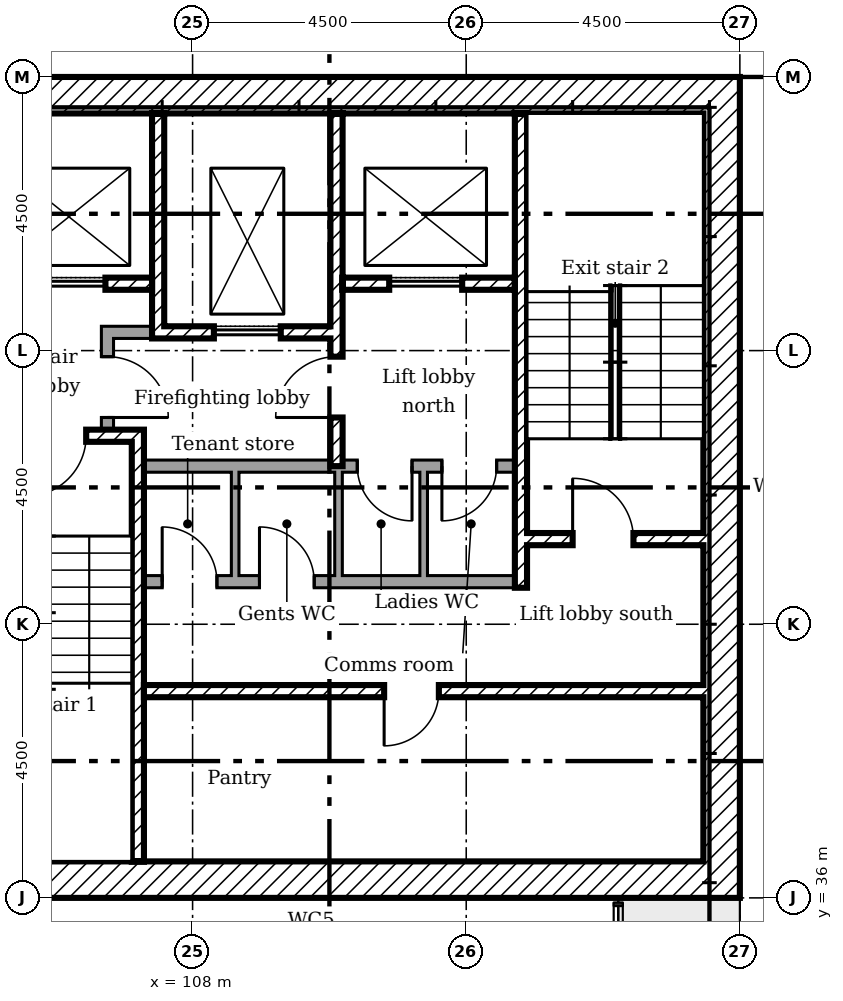
"""IFC4 building model, lengths in metres.
Left out: names, types, materials, properties, quantities, classifications, styles, units other than length and angle.
Written with IfcOpenShell. Run it as: python <this file> out.ifc"""

import sys

from ifc_helpers import new_model, si_unit, direction, frame, frame_2d, origin, place, context, subcontext, project, spatial, rectangle, extrude, element, fill, save


model = new_model("IFC4")
c1 = context("Model", 3, precision=1e-05, world=origin(), true_north=direction((0.0, 1.0)))
c2 = subcontext(c1, "Body", "Model", "MODEL_VIEW")
j1 = project(units=[si_unit("LENGTHUNIT", "METRE"), si_unit("PLANEANGLEUNIT", "RADIAN")], contexts=[c1])
p1 = place(None, origin())
s1 = spatial("IfcSite", under=j1, at=p1, CompositionType="ELEMENT")
p2 = place(p1, origin())
s2 = spatial("IfcBuilding", under=s1, at=p2, CompositionType="ELEMENT")
p3 = place(p2, frame((0.0, 0.0, 176.2)))
s3 = spatial("IfcBuildingStorey", under=s2, at=p3, CompositionType="ELEMENT", Elevation=176.2)
p4 = place(p3, frame((116.7, 36.0, 0.0), z_axis=(0.0, 0.0, 1.0), x_axis=(0.0, 1.0, 0.0)))
e1 = element("IfcWall", 1, at=p4, inside=s3, PredefinedType="SHEAR", context=c2, shape_type="SweptSolid", body=[
    extrude(rectangle(XDim=13.5, YDim=0.6, at=frame_2d((6.75, 0.0))), origin(), (0.0, 0.0, 1.0), 3.35),
])
for number, where in (
    (2, (103.5, 49.2, 0.0)),
    (3, (103.5, 36.3, 0.0)),
):
    element("IfcWall", number, at=place(p3, frame(where)), inside=s3, PredefinedType="SHEAR", context=c2, shape_type="SweptSolid", body=[
        extrude(rectangle(XDim=12.9, YDim=0.6, at=frame_2d((6.45, 0.0))), origin(), (0.0, 0.0, 1.0), 3.35),
    ])
p5 = place(p3, frame((107.433, 48.9, 0.0), z_axis=(0.0, 0.0, 1.0), x_axis=(0.0, -1.0, 0.0)))
e4 = element("IfcWall", 4, at=p5, inside=s3, PredefinedType="SHEAR", context=c2, shape_type="SweptSolid", body=[
    extrude(rectangle(XDim=3.7, YDim=0.2, at=frame_2d((1.85, 0.0))), origin(), (0.0, 0.0, 1.0), 3.35),
])
p6 = place(p3, frame((110.367, 48.9, 0.0), z_axis=(0.0, 0.0, 1.0), x_axis=(0.0, -1.0, 0.0)))
e5 = element("IfcWall", 5, at=p6, inside=s3, PredefinedType="SHEAR", context=c2, shape_type="SweptSolid", body=[
    extrude(rectangle(XDim=5.8, YDim=0.2, at=frame_2d((2.9, 0.0))), origin(), (0.0, 0.0, 1.0), 3.35),
])
p7 = place(p6, frame((4.0, 0.0, 0.0)))
e6 = element("IfcOpeningElement", 6, at=p7, cuts=e5, PredefinedType="OPENING", context=c2, shape_type="SweptSolid", body=[
    extrude(rectangle(XDim=1.0, YDim=2.1, at=frame_2d((0.5, 1.05))), frame((0.0, 0.11, 0.0), z_axis=(0.0, -1.0, 0.0), x_axis=(1.0, 0.0, 0.0)), (0.0, 0.0, 1.0), 0.22),
])
p8 = place(p3, frame((106.5, 45.3, 0.0)))
e7 = element("IfcWall", 7, at=p8, inside=s3, PredefinedType="PARTITIONING", context=c2, shape_type="SweptSolid", body=[
    extrude(rectangle(XDim=0.833, YDim=0.2, at=frame_2d((0.417, 0.0))), origin(), (0.0, 0.0, 1.0), 3.35),
])
p9 = place(p3, frame((106.6, 43.7, 0.0), z_axis=(0.0, 0.0, 1.0), x_axis=(0.0, 1.0, 0.0)))
e8 = element("IfcWall", 8, at=p9, inside=s3, PredefinedType="PARTITIONING", context=c2, shape_type="SweptSolid", body=[
    extrude(rectangle(XDim=1.5, YDim=0.2, at=frame_2d((0.75, 0.0))), origin(), (0.0, 0.0, 1.0), 3.35),
])
p10 = place(p9, frame((0.2, 0.0, 0.0)))
e9 = element("IfcOpeningElement", 9, at=p10, cuts=e8, PredefinedType="OPENING", context=c2, shape_type="SweptSolid", body=[
    extrude(rectangle(XDim=1.0, YDim=2.1, at=frame_2d((0.5, 1.05))), frame((0.0, 0.11, 0.0), z_axis=(0.0, -1.0, 0.0), x_axis=(1.0, 0.0, 0.0)), (0.0, 0.0, 1.0), 0.22),
])
p11 = place(p3, frame((104.1, 46.1, 0.0)))
e10 = element("IfcWall", 10, at=p11, inside=s3, PredefinedType="SHEAR", context=c2, shape_type="SweptSolid", body=[
    extrude(rectangle(XDim=3.233, YDim=0.2, at=frame_2d((1.617, 0.0))), origin(), (0.0, 0.0, 1.0), 3.35),
])
p12 = place(p11, frame((1.267, 0.0, 0.0)))
e11 = element("IfcOpeningElement", 11, at=p12, cuts=e10, PredefinedType="OPENING", context=c2, shape_type="SweptSolid", body=[
    extrude(rectangle(XDim=1.2, YDim=2.1, at=frame_2d((0.6, 1.05))), frame((0.0, 0.11, 0.0), z_axis=(0.0, -1.0, 0.0), x_axis=(1.0, 0.0, 0.0)), (0.0, 0.0, 1.0), 0.22),
])
p13 = place(p3, frame((110.467, 46.1, 0.0)))
e12 = element("IfcWall", 12, at=p13, inside=s3, PredefinedType="SHEAR", context=c2, shape_type="SweptSolid", body=[
    extrude(rectangle(XDim=2.833, YDim=0.2, at=frame_2d((1.417, 0.0))), origin(), (0.0, 0.0, 1.0), 3.35),
])
p14 = place(p13, frame((0.767, 0.0, 0.0)))
e13 = element("IfcOpeningElement", 13, at=p14, cuts=e12, PredefinedType="OPENING", context=c2, shape_type="SweptSolid", body=[
    extrude(rectangle(XDim=1.2, YDim=2.1, at=frame_2d((0.6, 1.05))), frame((0.0, 0.11, 0.0), z_axis=(0.0, -1.0, 0.0), x_axis=(1.0, 0.0, 0.0)), (0.0, 0.0, 1.0), 0.22),
])
p15 = place(p3, frame((107.533, 45.3, 0.0)))
e14 = element("IfcWall", 14, at=p15, inside=s3, PredefinedType="SHEAR", context=c2, shape_type="SweptSolid", body=[
    extrude(rectangle(XDim=2.733, YDim=0.2, at=frame_2d((1.367, 0.0))), origin(), (0.0, 0.0, 1.0), 3.35),
])
p16 = place(p15, frame((0.817, 0.0, 0.0)))
e15 = element("IfcOpeningElement", 15, at=p16, cuts=e14, PredefinedType="OPENING", context=c2, shape_type="SweptSolid", body=[
    extrude(rectangle(XDim=1.1, YDim=2.1, at=frame_2d((0.55, 1.05))), frame((0.0, 0.11, 0.0), z_axis=(0.0, -1.0, 0.0), x_axis=(1.0, 0.0, 0.0)), (0.0, 0.0, 1.0), 0.22),
])
p17 = place(p3, frame((107.2, 39.4, 0.0)))
e16 = element("IfcWall", 16, at=p17, inside=s3, PredefinedType="SHEAR", context=c2, shape_type="SweptSolid", body=[
    extrude(rectangle(XDim=9.2, YDim=0.2, at=frame_2d((4.6, 0.0))), origin(), (0.0, 0.0, 1.0), 3.35),
])
p18 = place(p17, frame((3.95, 0.0, 0.0)))
e17 = element("IfcOpeningElement", 17, at=p18, cuts=e16, PredefinedType="OPENING", context=c2, shape_type="SweptSolid", body=[
    extrude(rectangle(XDim=0.9, YDim=2.1, at=frame_2d((0.45, 1.05))), frame((0.0, 0.11, 0.0), z_axis=(0.0, -1.0, 0.0), x_axis=(1.0, 0.0, 0.0)), (0.0, 0.0, 1.0), 0.22),
])
p19 = place(p3, frame((107.1, 36.6, 0.0), z_axis=(0.0, 0.0, 1.0), x_axis=(0.0, 1.0, 0.0)))
e18 = element("IfcWall", 18, at=p19, inside=s3, PredefinedType="SHEAR", context=c2, shape_type="SweptSolid", body=[
    extrude(rectangle(XDim=7.1, YDim=0.2, at=frame_2d((3.55, 0.0))), origin(), (0.0, 0.0, 1.0), 3.35),
])
p20 = place(p3, frame((104.1, 43.6, 0.0)))
e19 = element("IfcWall", 19, at=p20, inside=s3, PredefinedType="SHEAR", context=c2, shape_type="SweptSolid", body=[
    extrude(rectangle(XDim=2.9, YDim=0.2, at=frame_2d((1.45, 0.0))), origin(), (0.0, 0.0, 1.0), 3.35),
])
p21 = place(p20, frame((1.15, 0.0, 0.0)))
e20 = element("IfcOpeningElement", 20, at=p21, cuts=e19, PredefinedType="OPENING", context=c2, shape_type="SweptSolid", body=[
    extrude(rectangle(XDim=1.0, YDim=2.1, at=frame_2d((0.5, 1.05))), frame((0.0, 0.11, 0.0), z_axis=(0.0, -1.0, 0.0), x_axis=(1.0, 0.0, 0.0)), (0.0, 0.0, 1.0), 0.22),
])
p22 = place(p3, frame((113.5, 41.9, 0.0)))
e21 = element("IfcWall", 21, at=p22, inside=s3, PredefinedType="SHEAR", context=c2, shape_type="SweptSolid", body=[
    extrude(rectangle(XDim=2.9, YDim=0.2, at=frame_2d((1.45, 0.0))), origin(), (0.0, 0.0, 1.0), 3.35),
])
p23 = place(p22, frame((0.75, 0.0, 0.0)))
e22 = element("IfcOpeningElement", 22, at=p23, cuts=e21, PredefinedType="OPENING", context=c2, shape_type="SweptSolid", body=[
    extrude(rectangle(XDim=1.0, YDim=2.1, at=frame_2d((0.5, 1.05))), frame((0.0, 0.11, 0.0), z_axis=(0.0, -1.0, 0.0), x_axis=(1.0, 0.0, 0.0)), (0.0, 0.0, 1.0), 0.22),
])
p24 = place(p3, frame((113.4, 41.1, 0.0), z_axis=(0.0, 0.0, 1.0), x_axis=(0.0, 1.0, 0.0)))
e23 = element("IfcWall", 23, at=p24, inside=s3, PredefinedType="SHEAR", context=c2, shape_type="SweptSolid", body=[
    extrude(rectangle(XDim=7.8, YDim=0.2, at=frame_2d((3.9, 0.0))), origin(), (0.0, 0.0, 1.0), 3.35),
])
p25 = place(p3, frame((107.2, 43.1, 0.0)))
e24 = element("IfcWall", 24, at=p25, inside=s3, PredefinedType="PARTITIONING", context=c2, shape_type="SweptSolid", body=[
    extrude(rectangle(XDim=6.1, YDim=0.2, at=frame_2d((3.05, 0.0))), origin(), (0.0, 0.0, 1.0), 3.35),
])
p26 = place(p25, frame((3.509, 0.0, 0.0)))
e25 = element("IfcOpeningElement", 25, at=p26, cuts=e24, PredefinedType="OPENING", context=c2, shape_type="SweptSolid", body=[
    extrude(rectangle(XDim=0.9, YDim=2.1, at=frame_2d((0.45, 1.05))), frame((0.0, 0.11, 0.0), z_axis=(0.0, -1.0, 0.0), x_axis=(1.0, 0.0, 0.0)), (0.0, 0.0, 1.0), 0.22),
])
p27 = place(p25, frame((4.9, 0.0, 0.0)))
e26 = element("IfcOpeningElement", 26, at=p27, cuts=e24, PredefinedType="OPENING", context=c2, shape_type="SweptSolid", body=[
    extrude(rectangle(XDim=0.9, YDim=2.1, at=frame_2d((0.45, 1.05))), frame((0.0, 0.11, 0.0), z_axis=(0.0, -1.0, 0.0), x_axis=(1.0, 0.0, 0.0)), (0.0, 0.0, 1.0), 0.22),
])
p28 = place(p3, frame((107.2, 41.2, 0.0)))
e27 = element("IfcWall", 27, at=p28, inside=s3, PredefinedType="PARTITIONING", context=c2, shape_type="SweptSolid", body=[
    extrude(rectangle(XDim=6.1, YDim=0.2, at=frame_2d((3.05, 0.0))), origin(), (0.0, 0.0, 1.0), 3.35),
])
p29 = place(p28, frame((0.3, 0.0, 0.0)))
e28 = element("IfcOpeningElement", 28, at=p29, cuts=e27, PredefinedType="OPENING", context=c2, shape_type="SweptSolid", body=[
    extrude(rectangle(XDim=0.9, YDim=2.1, at=frame_2d((0.45, 1.05))), frame((0.0, 0.11, 0.0), z_axis=(0.0, -1.0, 0.0), x_axis=(1.0, 0.0, 0.0)), (0.0, 0.0, 1.0), 0.22),
])
p30 = place(p28, frame((1.9, 0.0, 0.0)))
e29 = element("IfcOpeningElement", 29, at=p30, cuts=e27, PredefinedType="OPENING", context=c2, shape_type="SweptSolid", body=[
    extrude(rectangle(XDim=0.9, YDim=2.1, at=frame_2d((0.45, 1.05))), frame((0.0, 0.11, 0.0), z_axis=(0.0, -1.0, 0.0), x_axis=(1.0, 0.0, 0.0)), (0.0, 0.0, 1.0), 0.22),
])
for number, where, z_axis, x_axis in (
    (30, (108.7, 41.3, 0.0), (0.0, 0.0, 1.0), (0.0, 1.0, 0.0)),
    (31, (110.4, 41.3, 0.0), (0.0, 0.0, 1.0), (0.0, 1.0, 0.0)),
    (32, (111.8, 41.3, 0.0), (0.0, 0.0, 1.0), (0.0, 1.0, 0.0)),
):
    element("IfcWall", number, at=place(p3, frame(where, z_axis=z_axis, x_axis=x_axis)), inside=s3, PredefinedType="PARTITIONING", context=c2, shape_type="SweptSolid", body=[
        extrude(rectangle(XDim=1.7, YDim=0.125, at=frame_2d((0.85, 0.0))), origin(), (0.0, 0.0, 1.0), 3.35),
    ])
p31 = place(p21, frame((1.0, 0.0, 0.0), x_axis=(-1.0, 0.0, 0.0)))
e33 = element("IfcDoor", 33, at=p31, inside=s3, OperationType="SINGLE_SWING_LEFT", PredefinedType="DOOR", context=c2, shape_type="SweptSolid", body=[
    extrude(rectangle(XDim=1.0, YDim=2.1, at=frame_2d((0.5, 1.05))), frame((0.0, 0.025, 0.0), z_axis=(0.0, -1.0, 0.0), x_axis=(1.0, 0.0, 0.0)), (0.0, 0.0, 1.0), 0.05),
])
fill(e20, e33)
p32 = place(p23, origin())
e34 = element("IfcDoor", 34, at=p32, inside=s3, OperationType="SINGLE_SWING_RIGHT", PredefinedType="DOOR", context=c2, shape_type="SweptSolid", body=[
    extrude(rectangle(XDim=1.0, YDim=2.1, at=frame_2d((0.5, 1.05))), frame((0.0, 0.025, 0.0), z_axis=(0.0, -1.0, 0.0), x_axis=(1.0, 0.0, 0.0)), (0.0, 0.0, 1.0), 0.05),
])
fill(e22, e34)
p33 = place(p7, frame((1.0, 0.0, 0.0), x_axis=(-1.0, 0.0, 0.0)))
e35 = element("IfcDoor", 35, at=p33, inside=s3, OperationType="SINGLE_SWING_RIGHT", PredefinedType="DOOR", context=c2, shape_type="SweptSolid", body=[
    extrude(rectangle(XDim=1.0, YDim=2.1, at=frame_2d((0.5, 1.05))), frame((0.0, 0.025, 0.0), z_axis=(0.0, -1.0, 0.0), x_axis=(1.0, 0.0, 0.0)), (0.0, 0.0, 1.0), 0.05),
])
fill(e6, e35)
p34 = place(p10, frame((1.0, 0.0, 0.0), x_axis=(-1.0, 0.0, 0.0)))
e36 = element("IfcDoor", 36, at=p34, inside=s3, OperationType="SINGLE_SWING_LEFT", PredefinedType="DOOR", context=c2, shape_type="SweptSolid", body=[
    extrude(rectangle(XDim=1.0, YDim=2.1, at=frame_2d((0.5, 1.05))), frame((0.0, 0.025, 0.0), z_axis=(0.0, -1.0, 0.0), x_axis=(1.0, 0.0, 0.0)), (0.0, 0.0, 1.0), 0.05),
])
fill(e9, e36)
p35 = place(p18, frame((0.9, 0.0, 0.0), x_axis=(-1.0, 0.0, 0.0)))
e37 = element("IfcDoor", 37, at=p35, inside=s3, OperationType="SINGLE_SWING_LEFT", PredefinedType="DOOR", context=c2, shape_type="SweptSolid", body=[
    extrude(rectangle(XDim=0.9, YDim=2.1, at=frame_2d((0.45, 1.05))), frame((0.0, 0.025, 0.0), z_axis=(0.0, -1.0, 0.0), x_axis=(1.0, 0.0, 0.0)), (0.0, 0.0, 1.0), 0.05),
])
fill(e17, e37)
p36 = place(p29, origin())
e38 = element("IfcDoor", 38, at=p36, inside=s3, OperationType="SINGLE_SWING_RIGHT", PredefinedType="DOOR", context=c2, shape_type="SweptSolid", body=[
    extrude(rectangle(XDim=0.9, YDim=2.1, at=frame_2d((0.45, 1.05))), frame((0.0, 0.025, 0.0), z_axis=(0.0, -1.0, 0.0), x_axis=(1.0, 0.0, 0.0)), (0.0, 0.0, 1.0), 0.05),
])
fill(e28, e38)
p37 = place(p30, origin())
e39 = element("IfcDoor", 39, at=p37, inside=s3, OperationType="SINGLE_SWING_RIGHT", PredefinedType="DOOR", context=c2, shape_type="SweptSolid", body=[
    extrude(rectangle(XDim=0.9, YDim=2.1, at=frame_2d((0.45, 1.05))), frame((0.0, 0.025, 0.0), z_axis=(0.0, -1.0, 0.0), x_axis=(1.0, 0.0, 0.0)), (0.0, 0.0, 1.0), 0.05),
])
fill(e29, e39)
p38 = place(p26, frame((0.9, 0.0, 0.0), x_axis=(-1.0, 0.0, 0.0)))
e40 = element("IfcDoor", 40, at=p38, inside=s3, OperationType="SINGLE_SWING_RIGHT", PredefinedType="DOOR", context=c2, shape_type="SweptSolid", body=[
    extrude(rectangle(XDim=0.9, YDim=2.1, at=frame_2d((0.45, 1.05))), frame((0.0, 0.025, 0.0), z_axis=(0.0, -1.0, 0.0), x_axis=(1.0, 0.0, 0.0)), (0.0, 0.0, 1.0), 0.05),
])
fill(e25, e40)
p39 = place(p27, frame((0.9, 0.0, 0.0), x_axis=(-1.0, 0.0, 0.0)))
e41 = element("IfcDoor", 41, at=p39, inside=s3, OperationType="SINGLE_SWING_LEFT", PredefinedType="DOOR", context=c2, shape_type="SweptSolid", body=[
    extrude(rectangle(XDim=0.9, YDim=2.1, at=frame_2d((0.45, 1.05))), frame((0.0, 0.025, 0.0), z_axis=(0.0, -1.0, 0.0), x_axis=(1.0, 0.0, 0.0)), (0.0, 0.0, 1.0), 0.05),
])
fill(e26, e41)
p40 = place(p16, origin())
e42 = element("IfcDoor", 42, at=p40, inside=s3, OperationType="SLIDING_TO_LEFT", PredefinedType="DOOR", context=c2, shape_type="SweptSolid", body=[
    extrude(rectangle(XDim=1.1, YDim=2.1, at=frame_2d((0.55, 1.05))), frame((0.0, 0.025, 0.0), z_axis=(0.0, -1.0, 0.0), x_axis=(1.0, 0.0, 0.0)), (0.0, 0.0, 1.0), 0.05),
])
fill(e15, e42)
p41 = place(p12, origin())
e43 = element("IfcDoor", 43, at=p41, inside=s3, OperationType="SLIDING_TO_LEFT", PredefinedType="DOOR", context=c2, shape_type="SweptSolid", body=[
    extrude(rectangle(XDim=1.2, YDim=2.1, at=frame_2d((0.6, 1.05))), frame((0.0, 0.025, 0.0), z_axis=(0.0, -1.0, 0.0), x_axis=(1.0, 0.0, 0.0)), (0.0, 0.0, 1.0), 0.05),
])
fill(e11, e43)
p42 = place(p14, origin())
e44 = element("IfcDoor", 44, at=p42, inside=s3, OperationType="SLIDING_TO_LEFT", PredefinedType="DOOR", context=c2, shape_type="SweptSolid", body=[
    extrude(rectangle(XDim=1.2, YDim=2.1, at=frame_2d((0.6, 1.05))), frame((0.0, 0.025, 0.0), z_axis=(0.0, -1.0, 0.0), x_axis=(1.0, 0.0, 0.0)), (0.0, 0.0, 1.0), 0.05),
])
fill(e13, e44)
save(model, sys.argv[1])
